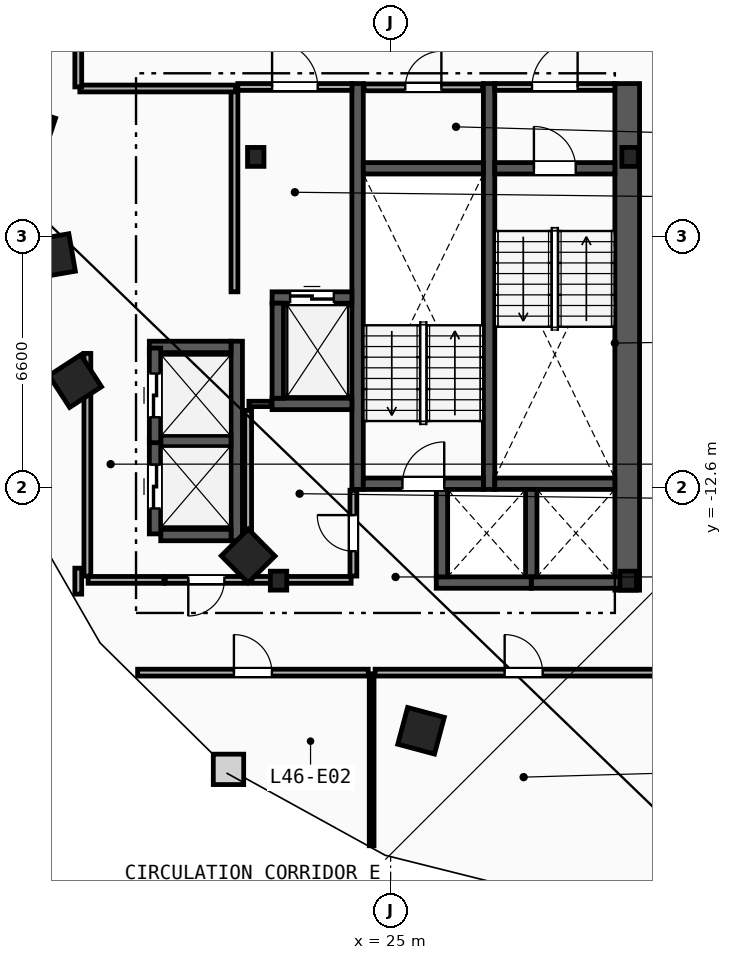
"""IFC4 building model, lengths in metres.
Left out: names, types, materials, properties, quantities, classifications, styles, units other than length and angle.
Written with IfcOpenShell. Run it as: python <this file> out.ifc"""

import sys

from ifc_helpers import new_model, si_unit, direction, frame, frame_2d, origin, origin_2d, place, context, subcontext, project, spatial, rectangle, i_section, extrude, element, fill, save


model = new_model("IFC4")
c1 = context("Model", 3, precision=1e-05, world=origin(), true_north=direction((0.0, 1.0)))
c2 = subcontext(c1, "Body", "Model", "MODEL_VIEW")
j1 = project(units=[si_unit("LENGTHUNIT", "METRE"), si_unit("PLANEANGLEUNIT", "RADIAN")], contexts=[c1])
p1 = place(None, origin())
s1 = spatial("IfcSite", under=j1, at=p1, CompositionType="ELEMENT")
p2 = place(p1, origin())
s2 = spatial("IfcBuilding", under=s1, at=p2, CompositionType="ELEMENT")
p3 = place(p2, frame((0.0, 0.0, 176.4)))
s3 = spatial("IfcBuildingStorey", under=s2, at=p3, CompositionType="ELEMENT", Elevation=176.4)
for number, where, z_axis, x_axis in (
    (1, (31.3, -3.9, 0.0), (0.0, 0.0, 1.0), (1.0, 0.0, 0.0)),
    (2, (21.45, -3.9, 0.0), (0.0, 0.0, 1.0), (1.0, 0.0, 0.0)),
    (3, (22.05, -15.05, 0.0), (0.0, 0.0, 1.0), (1.0, 0.0, 0.0)),
    (4, (31.25, -15.05, 0.0), (0.0, 0.0, 1.0), (1.0, 0.0, 0.0)),
):
    element("IfcColumn", number, at=place(p3, frame(where, z_axis=z_axis, x_axis=x_axis)), inside=s3, PredefinedType="COLUMN", context=c2, shape_type="SweptSolid", body=[
        extrude(i_section(OverallWidth=0.432, OverallDepth=0.498, WebThickness=0.056, FlangeThickness=0.089, FilletRadius=0.018, at=origin_2d()), origin(), (0.0, 0.0, 1.0), 3.6),
    ])
for number, where, z_axis, x_axis in (
    (5, (15.55, -3.2, 0.0), (0.0, 0.0, 1.0), (-0.315, -0.949, 0.0)),
    (6, (16.125, -6.5, 0.0), (0.0, 0.0, 1.0), (0.172, -0.985, 0.0)),
    (7, (16.7, -9.8, 0.0), (0.0, 0.0, 1.0), (0.544, -0.839, 0.0)),
    (8, (21.25, -14.4, 0.0), (0.0, 0.0, 1.0), (0.703, -0.711, 0.0)),
    (9, (25.8, -19.0, 0.0), (0.0, 0.0, 1.0), (0.966, -0.259, 0.0)),
):
    element("IfcColumn", number, at=place(p3, frame(where, z_axis=z_axis, x_axis=x_axis)), inside=s3, PredefinedType="COLUMN", context=c2, shape_type="SweptSolid", body=[
        extrude(rectangle(XDim=1.0, YDim=1.0, at=origin_2d()), origin(), (0.0, 0.0, 1.0), 3.6),
    ])
p4 = place(p3, frame((31.225, -15.3, 0.0), z_axis=(0.0, 0.0, 1.0), x_axis=(0.0, 1.0, 0.0)))
e10 = element("IfcWall", 10, at=p4, inside=s3, PredefinedType="SHEAR", context=c2, shape_type="SweptSolid", body=[
    extrude(rectangle(XDim=13.33, YDim=0.65, at=frame_2d((6.665, 0.0))), origin(), (0.0, 0.0, 1.0), 3.36),
])
for number, where, z_axis, x_axis in (
    (11, (27.59, -12.65, 0.0), (0.0, 0.0, 1.0), (0.0, 1.0, 0.0)),
    (12, (24.13, -12.65, 0.0), (0.0, 0.0, 1.0), (0.0, 1.0, 0.0)),
):
    element("IfcWall", number, at=place(p3, frame(where, z_axis=z_axis, x_axis=x_axis)), inside=s3, PredefinedType="SHEAR", context=c2, shape_type="SweptSolid", body=[
        extrude(rectangle(XDim=10.68, YDim=0.3, at=frame_2d((5.34, 0.0))), origin(), (0.0, 0.0, 1.0), 3.36),
    ])
p5 = place(p3, frame((27.74, -4.2, 0.0), z_axis=(0.0, 0.0, 1.0), x_axis=(1.0, 0.0, 0.0)))
e13 = element("IfcWall", 13, at=p5, inside=s3, PredefinedType="SHEAR", context=c2, shape_type="SweptSolid", body=[
    extrude(rectangle(XDim=3.16, YDim=0.3, at=frame_2d((1.58, 0.0))), origin(), (0.0, 0.0, 1.0), 3.36),
])
p6 = place(p5, frame((1.03, 0.0, 0.0)))
e14 = element("IfcOpeningElement", 14, at=p6, cuts=e13, PredefinedType="OPENING", context=c2, shape_type="SweptSolid", body=[
    extrude(rectangle(XDim=1.1, YDim=2.15, at=frame_2d((0.55, 1.075))), frame((0.0, 0.16, 0.0), z_axis=(0.0, -1.0, 0.0), x_axis=(1.0, 0.0, 0.0)), (0.0, 0.0, 1.0), 0.32),
])
p7 = place(p3, frame((27.74, -12.5, 0.0), z_axis=(0.0, 0.0, 1.0), x_axis=(1.0, 0.0, 0.0)))
e15 = element("IfcWall", 15, at=p7, inside=s3, PredefinedType="SHEAR", context=c2, shape_type="SweptSolid", body=[
    extrude(rectangle(XDim=3.16, YDim=0.3, at=frame_2d((1.58, 0.0))), origin(), (0.0, 0.0, 1.0), 3.36),
])
p8 = place(p3, frame((24.28, -12.5, 0.0), z_axis=(0.0, 0.0, 1.0), x_axis=(1.0, 0.0, 0.0)))
e16 = element("IfcWall", 16, at=p8, inside=s3, PredefinedType="SHEAR", context=c2, shape_type="SweptSolid", body=[
    extrude(rectangle(XDim=3.16, YDim=0.3, at=frame_2d((1.58, 0.0))), origin(), (0.0, 0.0, 1.0), 3.36),
])
p9 = place(p8, frame((1.03, 0.0, 0.0)))
e17 = element("IfcOpeningElement", 17, at=p9, cuts=e16, PredefinedType="OPENING", context=c2, shape_type="SweptSolid", body=[
    extrude(rectangle(XDim=1.1, YDim=2.15, at=frame_2d((0.55, 1.075))), frame((0.0, 0.16, 0.0), z_axis=(0.0, -1.0, 0.0), x_axis=(1.0, 0.0, 0.0)), (0.0, 0.0, 1.0), 0.32),
])
p10 = place(p3, frame((24.28, -4.2, 0.0), z_axis=(0.0, 0.0, 1.0), x_axis=(1.0, 0.0, 0.0)))
e18 = element("IfcWall", 18, at=p10, inside=s3, PredefinedType="SHEAR", context=c2, shape_type="SweptSolid", body=[
    extrude(rectangle(XDim=3.16, YDim=0.3, at=frame_2d((1.58, 0.0))), origin(), (0.0, 0.0, 1.0), 3.36),
])
p11 = place(p3, frame((20.89, -7.45, 0.0), z_axis=(0.0, 0.0, 1.0), x_axis=(0.0, 1.0, 0.0)))
e19 = element("IfcWall", 19, at=p11, inside=s3, PredefinedType="PARTITIONING", context=c2, shape_type="SweptSolid", body=[
    extrude(rectangle(XDim=5.3, YDim=0.18, at=frame_2d((2.65, 0.0))), origin(), (0.0, 0.0, 1.0), 3.36),
])
p12 = place(p3, frame((20.98, -2.06, 0.0), z_axis=(0.0, 0.0, 1.0), x_axis=(1.0, 0.0, 0.0)))
e20 = element("IfcWall", 20, at=p12, inside=s3, PredefinedType="PARTITIONING", context=c2, shape_type="SweptSolid", body=[
    extrude(rectangle(XDim=3.0, YDim=0.18, at=frame_2d((1.5, 0.0))), origin(), (0.0, 0.0, 1.0), 3.36),
])
p13 = place(p12, frame((0.9, 0.0, 0.0)))
e21 = element("IfcOpeningElement", 21, at=p13, cuts=e20, PredefinedType="OPENING", context=c2, shape_type="SweptSolid", body=[
    extrude(rectangle(XDim=1.2, YDim=2.15, at=frame_2d((0.6, 1.075))), frame((0.0, 0.1, 0.0), z_axis=(0.0, -1.0, 0.0), x_axis=(1.0, 0.0, 0.0)), (0.0, 0.0, 1.0), 0.2),
])
p14 = place(p3, frame((27.74, -2.06, 0.0), z_axis=(0.0, 0.0, 1.0), x_axis=(1.0, 0.0, 0.0)))
e22 = element("IfcWall", 22, at=p14, inside=s3, PredefinedType="PARTITIONING", context=c2, shape_type="SweptSolid", body=[
    extrude(rectangle(XDim=3.16, YDim=0.18, at=frame_2d((1.58, 0.0))), origin(), (0.0, 0.0, 1.0), 3.36),
])
p15 = place(p14, frame((0.98, 0.0, 0.0)))
e23 = element("IfcOpeningElement", 23, at=p15, cuts=e22, PredefinedType="OPENING", context=c2, shape_type="SweptSolid", body=[
    extrude(rectangle(XDim=1.2, YDim=2.15, at=frame_2d((0.6, 1.075))), frame((0.0, 0.1, 0.0), z_axis=(0.0, -1.0, 0.0), x_axis=(1.0, 0.0, 0.0)), (0.0, 0.0, 1.0), 0.2),
])
p16 = place(p3, frame((21.88, -7.6, 0.0), z_axis=(0.0, 0.0, 1.0), x_axis=(1.0, 0.0, 0.0)))
e24 = element("IfcWall", 24, at=p16, inside=s3, PredefinedType="SHEAR", context=c2, shape_type="SweptSolid", body=[
    extrude(rectangle(XDim=2.1, YDim=0.3, at=frame_2d((1.05, 0.0))), origin(), (0.0, 0.0, 1.0), 3.36),
])
p17 = place(p16, frame((0.475, 0.0, 0.0)))
e25 = element("IfcOpeningElement", 25, at=p17, cuts=e24, PredefinedType="OPENING", context=c2, shape_type="SweptSolid", body=[
    extrude(rectangle(XDim=1.15, YDim=2.2, at=frame_2d((0.575, 1.1))), frame((0.0, 0.16, 0.0), z_axis=(0.0, -1.0, 0.0), x_axis=(1.0, 0.0, 0.0)), (0.0, 0.0, 1.0), 0.32),
])
p18 = place(p3, frame((21.88, -10.4, 0.0), z_axis=(0.0, 0.0, 1.0), x_axis=(1.0, 0.0, 0.0)))
e26 = element("IfcWall", 26, at=p18, inside=s3, PredefinedType="SHEAR", context=c2, shape_type="SweptSolid", body=[
    extrude(rectangle(XDim=2.1, YDim=0.3, at=frame_2d((1.05, 0.0))), origin(), (0.0, 0.0, 1.0), 3.36),
])
for number, where, z_axis, x_axis in (
    (27, (22.03, -10.25, 0.0), (0.0, 0.0, 1.0), (0.0, 1.0, 0.0)),
    (28, (28.7, -15.1, 0.0), (0.0, 0.0, 1.0), (1.0, 0.0, 0.0)),
):
    element("IfcWall", number, at=place(p3, frame(where, z_axis=z_axis, x_axis=x_axis)), inside=s3, PredefinedType="SHEAR", context=c2, shape_type="SweptSolid", body=[
        extrude(rectangle(XDim=2.5, YDim=0.3, at=frame_2d((1.25, 0.0))), origin(), (0.0, 0.0, 1.0), 3.36),
    ])
p19 = place(p3, frame((28.7, -14.95, 0.0), z_axis=(0.0, 0.0, 1.0), x_axis=(0.0, 1.0, 0.0)))
e29 = element("IfcWall", 29, at=p19, inside=s3, PredefinedType="SHEAR", context=c2, shape_type="SweptSolid", body=[
    extrude(rectangle(XDim=2.3, YDim=0.3, at=frame_2d((1.15, 0.0))), origin(), (0.0, 0.0, 1.0), 3.36),
])
p20 = place(p3, frame((26.2, -15.1, 0.0), z_axis=(0.0, 0.0, 1.0), x_axis=(1.0, 0.0, 0.0)))
e30 = element("IfcWall", 30, at=p20, inside=s3, PredefinedType="SHEAR", context=c2, shape_type="SweptSolid", body=[
    extrude(rectangle(XDim=2.5, YDim=0.3, at=frame_2d((1.25, 0.0))), origin(), (0.0, 0.0, 1.0), 3.36),
])
p21 = place(p3, frame((26.35, -14.95, 0.0), z_axis=(0.0, 0.0, 1.0), x_axis=(0.0, 1.0, 0.0)))
e31 = element("IfcWall", 31, at=p21, inside=s3, PredefinedType="SHEAR", context=c2, shape_type="SweptSolid", body=[
    extrude(rectangle(XDim=2.3, YDim=0.3, at=frame_2d((1.15, 0.0))), origin(), (0.0, 0.0, 1.0), 3.36),
])
p22 = place(p3, frame((20.95, -14.0, 0.0), z_axis=(0.0, 0.0, 1.0), x_axis=(0.0, 1.0, 0.0)))
e32 = element("IfcWall", 32, at=p22, inside=s3, PredefinedType="SHEAR", context=c2, shape_type="SweptSolid", body=[
    extrude(rectangle(XDim=5.25, YDim=0.3, at=frame_2d((2.625, 0.0))), origin(), (0.0, 0.0, 1.0), 3.36),
])
p23 = place(p3, frame((18.95, -13.85, 0.0), z_axis=(0.0, 0.0, 1.0), x_axis=(1.0, 0.0, 0.0)))
e33 = element("IfcWall", 33, at=p23, inside=s3, PredefinedType="SHEAR", context=c2, shape_type="SweptSolid", body=[
    extrude(rectangle(XDim=1.85, YDim=0.3, at=frame_2d((0.925, 0.0))), origin(), (0.0, 0.0, 1.0), 3.36),
])
p24 = place(p3, frame((18.65, -8.9, 0.0), z_axis=(0.0, 0.0, 1.0), x_axis=(1.0, 0.0, 0.0)))
e34 = element("IfcWall", 34, at=p24, inside=s3, PredefinedType="SHEAR", context=c2, shape_type="SweptSolid", body=[
    extrude(rectangle(XDim=2.15, YDim=0.3, at=frame_2d((1.075, 0.0))), origin(), (0.0, 0.0, 1.0), 3.36),
])
p25 = place(p3, frame((18.95, -11.375, 0.0), z_axis=(0.0, 0.0, 1.0), x_axis=(1.0, 0.0, 0.0)))
e35 = element("IfcWall", 35, at=p25, inside=s3, PredefinedType="SHEAR", context=c2, shape_type="SweptSolid", body=[
    extrude(rectangle(XDim=1.85, YDim=0.3, at=frame_2d((0.925, 0.0))), origin(), (0.0, 0.0, 1.0), 3.36),
])
p26 = place(p3, frame((18.8, -13.82, 0.0), z_axis=(0.0, 0.0, 1.0), x_axis=(0.0, 1.0, 0.0)))
e36 = element("IfcWall", 36, at=p26, inside=s3, PredefinedType="SHEAR", context=c2, shape_type="SweptSolid", body=[
    extrude(rectangle(XDim=2.49, YDim=0.3, at=frame_2d((1.245, 0.0))), origin(), (0.0, 0.0, 1.0), 3.36),
])
p27 = place(p26, frame((0.67, 0.0, 0.0)))
e37 = element("IfcOpeningElement", 37, at=p27, cuts=e36, PredefinedType="OPENING", context=c2, shape_type="SweptSolid", body=[
    extrude(rectangle(XDim=1.15, YDim=2.2, at=frame_2d((0.575, 1.1))), frame((0.0, 0.16, 0.0), z_axis=(0.0, -1.0, 0.0), x_axis=(1.0, 0.0, 0.0)), (0.0, 0.0, 1.0), 0.32),
])
p28 = place(p3, frame((18.8, -11.42, 0.0), z_axis=(0.0, 0.0, 1.0), x_axis=(0.0, 1.0, 0.0)))
e38 = element("IfcWall", 38, at=p28, inside=s3, PredefinedType="SHEAR", context=c2, shape_type="SweptSolid", body=[
    extrude(rectangle(XDim=2.49, YDim=0.3, at=frame_2d((1.245, 0.0))), origin(), (0.0, 0.0, 1.0), 3.36),
])
p29 = place(p28, frame((0.67, 0.0, 0.0)))
e39 = element("IfcOpeningElement", 39, at=p29, cuts=e38, PredefinedType="OPENING", context=c2, shape_type="SweptSolid", body=[
    extrude(rectangle(XDim=1.15, YDim=2.2, at=frame_2d((0.575, 1.1))), frame((0.0, 0.16, 0.0), z_axis=(0.0, -1.0, 0.0), x_axis=(1.0, 0.0, 0.0)), (0.0, 0.0, 1.0), 0.32),
])
p30 = place(p3, frame((17.02, -14.93, 0.0), z_axis=(0.0, 0.0, 1.0), x_axis=(0.0, 1.0, 0.0)))
e40 = element("IfcWall", 40, at=p30, inside=s3, PredefinedType="PARTITIONING", context=c2, shape_type="SweptSolid", body=[
    extrude(rectangle(XDim=5.86, YDim=0.18, at=frame_2d((2.93, 0.0))), origin(), (0.0, 0.0, 1.0), 3.36),
])
p31 = place(p3, frame((17.04, -15.03, 0.0), z_axis=(0.0, 0.0, 1.0), x_axis=(1.0, 0.0, 0.0)))
e41 = element("IfcWall", 41, at=p31, inside=s3, PredefinedType="PARTITIONING", context=c2, shape_type="SweptSolid", body=[
    extrude(rectangle(XDim=1.99, YDim=0.18, at=frame_2d((0.995, 0.0))), origin(), (0.0, 0.0, 1.0), 3.36),
])
p32 = place(p3, frame((21.23, -15.03, 0.0), z_axis=(0.0, 0.0, 1.0), x_axis=(-1.0, 0.0, 0.0)))
e42 = element("IfcWall", 42, at=p32, inside=s3, PredefinedType="PARTITIONING", context=c2, shape_type="SweptSolid", body=[
    extrude(rectangle(XDim=2.16, YDim=0.18, at=frame_2d((1.08, 0.0))), origin(), (0.0, 0.0, 1.0), 3.36),
])
p33 = place(p32, frame((0.605, 0.0, 0.0)))
e43 = element("IfcOpeningElement", 43, at=p33, cuts=e42, PredefinedType="OPENING", context=c2, shape_type="SweptSolid", body=[
    extrude(rectangle(XDim=0.95, YDim=2.1, at=frame_2d((0.475, 1.05))), frame((0.0, 0.1, 0.0), z_axis=(0.0, -1.0, 0.0), x_axis=(1.0, 0.0, 0.0)), (0.0, 0.0, 1.0), 0.2),
])
p34 = place(p3, frame((21.27, -10.4, 0.0), z_axis=(0.0, 0.0, 1.0), x_axis=(1.0, 0.0, 0.0)))
e44 = element("IfcWall", 44, at=p34, inside=s3, PredefinedType="PARTITIONING", context=c2, shape_type="SweptSolid", body=[
    extrude(rectangle(XDim=0.59, YDim=0.14, at=frame_2d((0.295, 0.0))), origin(), (0.0, 0.0, 1.0), 3.36),
])
p35 = place(p3, frame((21.25, -14.93, 0.0), z_axis=(0.0, 0.0, 1.0), x_axis=(0.0, 1.0, 0.0)))
e45 = element("IfcWall", 45, at=p35, inside=s3, PredefinedType="PARTITIONING", context=c2, shape_type="SweptSolid", body=[
    extrude(rectangle(XDim=4.36, YDim=0.18, at=frame_2d((2.18, 0.0))), origin(), (0.0, 0.0, 1.0), 3.36),
])
p36 = place(p3, frame((21.35, -15.03, 0.0), z_axis=(0.0, 0.0, 1.0), x_axis=(1.0, 0.0, 0.0)))
e46 = element("IfcWall", 46, at=p36, inside=s3, PredefinedType="PARTITIONING", context=c2, shape_type="SweptSolid", body=[
    extrude(rectangle(XDim=2.61, YDim=0.18, at=frame_2d((1.305, 0.0))), origin(), (0.0, 0.0, 1.0), 2.433),
])
p37 = place(p3, frame((24.3, -2.07, 0.0), z_axis=(0.0, 0.0, 1.0), x_axis=(1.0, 0.0, 0.0)))
e47 = element("IfcWall", 47, at=p37, inside=s3, PredefinedType="PARTITIONING", context=c2, shape_type="SweptSolid", body=[
    extrude(rectangle(XDim=3.12, YDim=0.18, at=frame_2d((1.56, 0.0))), origin(), (0.0, 0.0, 1.0), 3.36),
])
p38 = place(p37, frame((1.085, 0.0, 0.0)))
e48 = element("IfcOpeningElement", 48, at=p38, cuts=e47, PredefinedType="OPENING", context=c2, shape_type="SweptSolid", body=[
    extrude(rectangle(XDim=0.95, YDim=2.1, at=frame_2d((0.475, 1.05))), frame((0.0, 0.1, 0.0), z_axis=(0.0, -1.0, 0.0), x_axis=(1.0, 0.0, 0.0)), (0.0, 0.0, 1.0), 0.2),
])
p39 = place(p3, frame((24.02, -14.93, 0.0), z_axis=(0.0, 0.0, 1.0), x_axis=(0.0, 1.0, 0.0)))
e49 = element("IfcWall", 49, at=p39, inside=s3, PredefinedType="PARTITIONING", context=c2, shape_type="SweptSolid", body=[
    extrude(rectangle(XDim=2.26, YDim=0.18, at=frame_2d((1.13, 0.0))), origin(), (0.0, 0.0, 1.0), 3.36),
])
p40 = place(p39, frame((0.655, 0.0, 0.0)))
e50 = element("IfcOpeningElement", 50, at=p40, cuts=e49, PredefinedType="OPENING", context=c2, shape_type="SweptSolid", body=[
    extrude(rectangle(XDim=0.95, YDim=2.1, at=frame_2d((0.475, 1.05))), frame((0.0, 0.1, 0.0), z_axis=(0.0, -1.0, 0.0), x_axis=(1.0, 0.0, 0.0)), (0.0, 0.0, 1.0), 0.2),
])
p41 = place(p3, frame((24.5, -22.025, 0.0), z_axis=(0.0, 0.0, 1.0), x_axis=(0.0, 1.0, 0.0)))
e51 = element("IfcWall", 51, at=p41, inside=s3, PredefinedType="PARTITIONING", context=c2, shape_type="SweptSolid", body=[
    extrude(rectangle(XDim=4.525, YDim=0.125, at=frame_2d((2.263, 0.0))), origin(), (0.0, 0.0, 1.0), 3.36),
])
p42 = place(p3, frame((24.59, -17.47, 0.0), z_axis=(0.0, 0.0, 1.0), x_axis=(1.0, 0.0, 0.0)))
e52 = element("IfcWall", 52, at=p42, inside=s3, PredefinedType="PARTITIONING", context=c2, shape_type="SweptSolid", body=[
    extrude(rectangle(XDim=7.82, YDim=0.18, at=frame_2d((3.91, 0.0))), origin(), (0.0, 0.0, 1.0), 3.36),
])
p43 = place(p42, frame((3.41, 0.0, 0.0)))
e53 = element("IfcOpeningElement", 53, at=p43, cuts=e52, PredefinedType="OPENING", context=c2, shape_type="SweptSolid", body=[
    extrude(rectangle(XDim=1.0, YDim=2.15, at=frame_2d((0.5, 1.075))), frame((0.0, 0.1, 0.0), z_axis=(0.0, -1.0, 0.0), x_axis=(1.0, 0.0, 0.0)), (0.0, 0.0, 1.0), 0.2),
])
p44 = place(p3, frame((18.342, -17.47, 0.0), z_axis=(0.0, 0.0, 1.0), x_axis=(1.0, 0.0, 0.0)))
e54 = element("IfcWall", 54, at=p44, inside=s3, PredefinedType="PARTITIONING", context=c2, shape_type="SweptSolid", body=[
    extrude(rectangle(XDim=6.068, YDim=0.18, at=frame_2d((3.034, 0.0))), origin(), (0.0, 0.0, 1.0), 3.36),
])
p45 = place(p44, frame((2.534, 0.0, 0.0)))
e55 = element("IfcOpeningElement", 55, at=p45, cuts=e54, PredefinedType="OPENING", context=c2, shape_type="SweptSolid", body=[
    extrude(rectangle(XDim=1.0, YDim=2.15, at=frame_2d((0.5, 1.075))), frame((0.0, 0.1, 0.0), z_axis=(0.0, -1.0, 0.0), x_axis=(1.0, 0.0, 0.0)), (0.0, 0.0, 1.0), 0.2),
])
p46 = place(p3, frame((16.822, -2.1, 0.0), z_axis=(0.0, 0.0, 1.0), x_axis=(1.0, 0.0, 0.0)))
e56 = element("IfcWall", 56, at=p46, inside=s3, PredefinedType="PARTITIONING", context=c2, shape_type="SweptSolid", body=[
    extrude(rectangle(XDim=4.098, YDim=0.18, at=frame_2d((2.049, 0.0))), origin(), (0.0, 0.0, 1.0), 3.36),
])
p47 = place(p3, frame((16.78, 0.329, 0.0), z_axis=(0.0, 0.0, 1.0), x_axis=(0.0, -1.0, 0.0)))
e57 = element("IfcWall", 57, at=p47, inside=s3, PredefinedType="PARTITIONING", context=c2, shape_type="SweptSolid", body=[
    extrude(rectangle(XDim=2.387, YDim=0.18, at=frame_2d((1.194, 0.0))), origin(), (0.0, 0.0, 1.0), 3.36),
])
p48 = place(p3, frame((16.78, -14.721, 0.0), z_axis=(0.0, 0.0, 1.0), x_axis=(0.0, -1.0, 0.0)))
e58 = element("IfcWall", 58, at=p48, inside=s3, PredefinedType="PARTITIONING", context=c2, shape_type="SweptSolid", body=[
    extrude(rectangle(XDim=0.684, YDim=0.18, at=frame_2d((0.342, 0.0))), origin(), (0.0, 0.0, 1.0), 3.36),
])
p49 = place(p6, origin())
e59 = element("IfcDoor", 59, at=p49, inside=s3, OperationType="SINGLE_SWING_LEFT", PredefinedType="DOOR", context=c2, shape_type="SweptSolid", body=[
    extrude(rectangle(XDim=1.1, YDim=2.15, at=frame_2d((0.55, 1.075))), frame((0.0, 0.025, 0.0), z_axis=(0.0, -1.0, 0.0), x_axis=(1.0, 0.0, 0.0)), (0.0, 0.0, 1.0), 0.05),
])
fill(e14, e59)
p50 = place(p9, origin())
e60 = element("IfcDoor", 60, at=p50, inside=s3, OperationType="SINGLE_SWING_RIGHT", PredefinedType="DOOR", context=c2, shape_type="SweptSolid", body=[
    extrude(rectangle(XDim=1.1, YDim=2.15, at=frame_2d((0.55, 1.075))), frame((0.0, 0.025, 0.0), z_axis=(0.0, -1.0, 0.0), x_axis=(1.0, 0.0, 0.0)), (0.0, 0.0, 1.0), 0.05),
])
fill(e17, e60)
p51 = place(p13, origin())
e61 = element("IfcDoor", 61, at=p51, inside=s3, OperationType="SINGLE_SWING_LEFT", PredefinedType="DOOR", context=c2, shape_type="SweptSolid", body=[
    extrude(rectangle(XDim=1.2, YDim=2.15, at=frame_2d((0.6, 1.075))), frame((0.0, 0.025, 0.0), z_axis=(0.0, -1.0, 0.0), x_axis=(1.0, 0.0, 0.0)), (0.0, 0.0, 1.0), 0.05),
])
fill(e21, e61)
p52 = place(p15, origin())
e62 = element("IfcDoor", 62, at=p52, inside=s3, OperationType="SINGLE_SWING_RIGHT", PredefinedType="DOOR", context=c2, shape_type="SweptSolid", body=[
    extrude(rectangle(XDim=1.2, YDim=2.15, at=frame_2d((0.6, 1.075))), frame((0.0, 0.025, 0.0), z_axis=(0.0, -1.0, 0.0), x_axis=(1.0, 0.0, 0.0)), (0.0, 0.0, 1.0), 0.05),
])
fill(e23, e62)
p53 = place(p17, origin())
e63 = element("IfcDoor", 63, at=p53, inside=s3, OperationType="SLIDING_TO_LEFT", PredefinedType="TRAPDOOR", context=c2, shape_type="SweptSolid", body=[
    extrude(rectangle(XDim=1.15, YDim=2.2, at=frame_2d((0.575, 1.1))), frame((0.0, 0.025, 0.0), z_axis=(0.0, -1.0, 0.0), x_axis=(1.0, 0.0, 0.0)), (0.0, 0.0, 1.0), 0.05),
])
fill(e25, e63)
p54 = place(p27, origin())
e64 = element("IfcDoor", 64, at=p54, inside=s3, OperationType="SLIDING_TO_LEFT", PredefinedType="TRAPDOOR", context=c2, shape_type="SweptSolid", body=[
    extrude(rectangle(XDim=1.15, YDim=2.2, at=frame_2d((0.575, 1.1))), frame((0.0, 0.025, 0.0), z_axis=(0.0, -1.0, 0.0), x_axis=(1.0, 0.0, 0.0)), (0.0, 0.0, 1.0), 0.05),
])
fill(e37, e64)
p55 = place(p29, origin())
e65 = element("IfcDoor", 65, at=p55, inside=s3, OperationType="SLIDING_TO_LEFT", PredefinedType="TRAPDOOR", context=c2, shape_type="SweptSolid", body=[
    extrude(rectangle(XDim=1.15, YDim=2.2, at=frame_2d((0.575, 1.1))), frame((0.0, 0.025, 0.0), z_axis=(0.0, -1.0, 0.0), x_axis=(1.0, 0.0, 0.0)), (0.0, 0.0, 1.0), 0.05),
])
fill(e39, e65)
p56 = place(p43, origin())
e66 = element("IfcDoor", 66, at=p56, inside=s3, OperationType="SINGLE_SWING_LEFT", PredefinedType="DOOR", context=c2, shape_type="SweptSolid", body=[
    extrude(rectangle(XDim=1.0, YDim=2.15, at=frame_2d((0.5, 1.075))), frame((0.0, 0.025, 0.0), z_axis=(0.0, -1.0, 0.0), x_axis=(1.0, 0.0, 0.0)), (0.0, 0.0, 1.0), 0.05),
])
fill(e53, e66)
p57 = place(p45, origin())
e67 = element("IfcDoor", 67, at=p57, inside=s3, OperationType="SINGLE_SWING_LEFT", PredefinedType="DOOR", context=c2, shape_type="SweptSolid", body=[
    extrude(rectangle(XDim=1.0, YDim=2.15, at=frame_2d((0.5, 1.075))), frame((0.0, 0.025, 0.0), z_axis=(0.0, -1.0, 0.0), x_axis=(1.0, 0.0, 0.0)), (0.0, 0.0, 1.0), 0.05),
])
fill(e55, e67)
p58 = place(p38, origin())
e68 = element("IfcDoor", 68, at=p58, inside=s3, OperationType="SINGLE_SWING_RIGHT", PredefinedType="DOOR", context=c2, shape_type="SweptSolid", body=[
    extrude(rectangle(XDim=0.95, YDim=2.1, at=frame_2d((0.475, 1.05))), frame((0.0, 0.025, 0.0), z_axis=(0.0, -1.0, 0.0), x_axis=(1.0, 0.0, 0.0)), (0.0, 0.0, 1.0), 0.05),
])
fill(e48, e68)
p59 = place(p40, origin())
e69 = element("IfcDoor", 69, at=p59, inside=s3, OperationType="SINGLE_SWING_RIGHT", PredefinedType="DOOR", context=c2, shape_type="SweptSolid", body=[
    extrude(rectangle(XDim=0.95, YDim=2.1, at=frame_2d((0.475, 1.05))), frame((0.0, 0.025, 0.0), z_axis=(0.0, -1.0, 0.0), x_axis=(1.0, 0.0, 0.0)), (0.0, 0.0, 1.0), 0.05),
])
fill(e50, e69)
p60 = place(p33, origin())
e70 = element("IfcDoor", 70, at=p60, inside=s3, OperationType="SINGLE_SWING_RIGHT", PredefinedType="DOOR", context=c2, shape_type="SweptSolid", body=[
    extrude(rectangle(XDim=0.95, YDim=2.1, at=frame_2d((0.475, 1.05))), frame((0.0, 0.025, 0.0), z_axis=(0.0, -1.0, 0.0), x_axis=(1.0, 0.0, 0.0)), (0.0, 0.0, 1.0), 0.05),
])
fill(e43, e70)
save(model, sys.argv[1])
